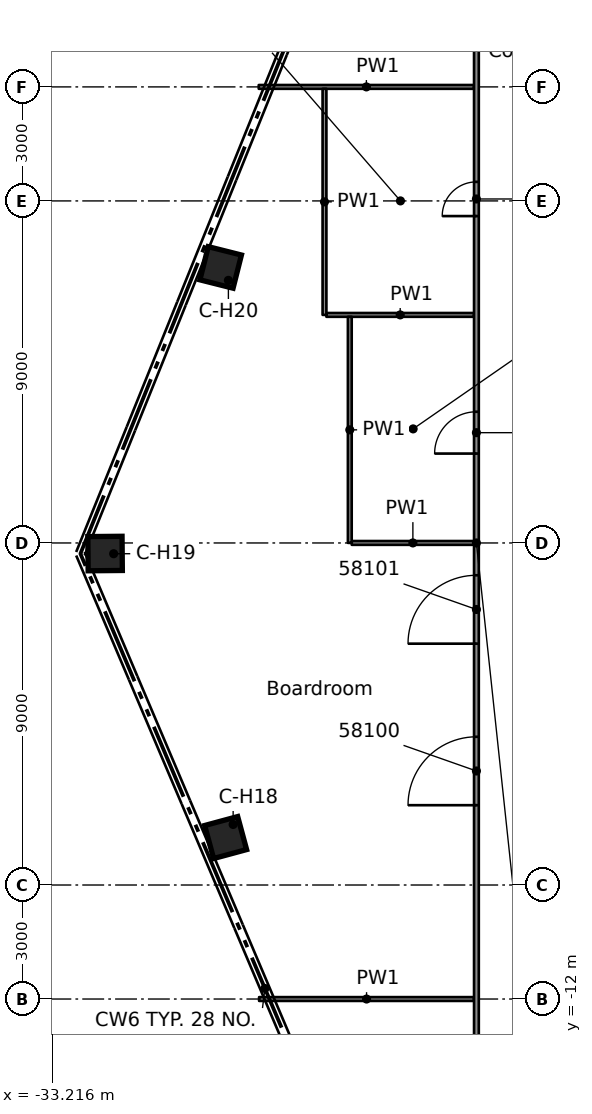
"""IFC4 building model, lengths in metres.
Left out: names, types, materials, properties, quantities, classifications, styles, units other than length and angle.
Written with IfcOpenShell. Run it as: python <this file> out.ifc"""

import sys

from ifc_helpers import new_model, si_unit, direction, frame, frame_2d, origin, origin_2d, place, context, subcontext, project, spatial, rectangle, extrude, element, fill, save


model = new_model("IFC4")
c1 = context("Model", 3, precision=1e-05, world=origin(), true_north=direction((0.0, 1.0)))
c2 = subcontext(c1, "Body", "Model", "MODEL_VIEW")
j1 = project(units=[si_unit("LENGTHUNIT", "METRE"), si_unit("PLANEANGLEUNIT", "RADIAN")], contexts=[c1])
p1 = place(None, origin())
s1 = spatial("IfcSite", under=j1, at=p1, CompositionType="ELEMENT")
p2 = place(p1, origin())
s2 = spatial("IfcBuilding", under=s1, at=p2, CompositionType="ELEMENT")
p3 = place(p2, frame((0.0, 0.0, 285.9)))
s3 = spatial("IfcBuildingStorey", under=s2, at=p3, CompositionType="ELEMENT", Elevation=285.9)
for number, where, z_axis, x_axis in (
    (1, (-28.649, -7.751, 0.0), (0.0, 0.0, 1.0), (-0.965, -0.261, 0.0)),
    (2, (-31.821, -0.278, 0.0), (0.0, 0.0, 1.0), (-1.0, -0.009, 0.0)),
    (3, (-28.78, 7.25, 0.0), (0.0, 0.0, 1.0), (-0.97, 0.244, 0.0)),
):
    element("IfcColumn", number, at=place(p3, frame(where, z_axis=z_axis, x_axis=x_axis)), inside=s3, PredefinedType="COLUMN", context=c2, shape_type="SweptSolid", body=[
        extrude(rectangle(XDim=0.9, YDim=0.9, at=origin_2d()), origin(), (0.0, 0.0, 1.0), 3.5),
    ])
p4 = place(p3, frame((-27.769, -12.0, 0.0), z_axis=(0.0, 0.0, 1.0), x_axis=(1.0, 0.0, 0.0)))
e4 = element("IfcWall", 4, at=p4, inside=s3, PredefinedType="PARTITIONING", context=c2, shape_type="SweptSolid", body=[
    extrude(rectangle(XDim=5.656, YDim=0.1, at=frame_2d((2.828, 0.0))), origin(), (0.0, 0.0, 1.0), 3.08),
])
p5 = place(p3, frame((-25.331, 0.001, 0.0), z_axis=(0.0, 0.0, 1.0), x_axis=(1.0, 0.0, 0.0)))
e5 = element("IfcWall", 5, at=p5, inside=s3, PredefinedType="PARTITIONING", context=c2, shape_type="SweptSolid", body=[
    extrude(rectangle(XDim=3.218, YDim=0.1, at=frame_2d((1.609, 0.0))), origin(), (0.0, 0.0, 1.0), 3.08),
])
p6 = place(p3, frame((-25.998, 6.001, 0.0), z_axis=(0.0, 0.0, 1.0), x_axis=(1.0, 0.0, 0.0)))
e6 = element("IfcWall", 6, at=p6, inside=s3, PredefinedType="PARTITIONING", context=c2, shape_type="SweptSolid", body=[
    extrude(rectangle(XDim=3.885, YDim=0.1, at=frame_2d((1.942, 0.0))), origin(), (0.0, 0.0, 1.0), 3.08),
])
p7 = place(p3, frame((-27.778, 12.0, 0.0), z_axis=(0.0, 0.0, 1.0), x_axis=(1.0, 0.0, 0.0)))
e7 = element("IfcWall", 7, at=p7, inside=s3, PredefinedType="PARTITIONING", context=c2, shape_type="SweptSolid", body=[
    extrude(rectangle(XDim=5.665, YDim=0.1, at=frame_2d((2.833, 0.0))), origin(), (0.0, 0.0, 1.0), 3.08),
])
p8 = place(p3, frame((-22.05, -15.051, 0.0), z_axis=(0.0, 0.0, 1.0), x_axis=(0.0, 1.0, 0.0)))
e8 = element("IfcWall", 8, at=p8, inside=s3, PredefinedType="PARTITIONING", context=c2, shape_type="SweptSolid", body=[
    extrude(rectangle(XDim=30.102, YDim=0.125, at=frame_2d((15.051, 0.0))), origin(), (0.0, 0.0, 1.0), 3.08),
])
p9 = place(p8, frame((8.151, 0.0, 0.0)))
e9 = element("IfcOpeningElement", 9, at=p9, cuts=e8, PredefinedType="OPENING", context=c2, shape_type="SweptSolid", body=[
    extrude(rectangle(XDim=1.8, YDim=2.1, at=frame_2d((0.9, 1.05))), frame((0.0, 0.073, 0.0), z_axis=(0.0, -1.0, 0.0), x_axis=(1.0, 0.0, 0.0)), (0.0, 0.0, 1.0), 0.145),
])
p10 = place(p8, frame((12.401, 0.0, 0.0)))
e10 = element("IfcOpeningElement", 10, at=p10, cuts=e8, PredefinedType="OPENING", context=c2, shape_type="SweptSolid", body=[
    extrude(rectangle(XDim=1.8, YDim=2.1, at=frame_2d((0.9, 1.05))), frame((0.0, 0.073, 0.0), z_axis=(0.0, -1.0, 0.0), x_axis=(1.0, 0.0, 0.0)), (0.0, 0.0, 1.0), 0.145),
])
p11 = place(p8, frame((23.652, 0.0, 0.0)))
e11 = element("IfcOpeningElement", 11, at=p11, cuts=e8, PredefinedType="OPENING", context=c2, shape_type="SweptSolid", body=[
    extrude(rectangle(XDim=0.9, YDim=2.1, at=frame_2d((0.45, 1.05))), frame((0.0, 0.073, 0.0), z_axis=(0.0, -1.0, 0.0), x_axis=(1.0, 0.0, 0.0)), (0.0, 0.0, 1.0), 0.145),
])
p12 = place(p8, frame((17.403, 0.0, 0.0)))
e12 = element("IfcOpeningElement", 12, at=p12, cuts=e8, PredefinedType="OPENING", context=c2, shape_type="SweptSolid", body=[
    extrude(rectangle(XDim=1.1, YDim=2.1, at=frame_2d((0.55, 1.05))), frame((0.0, 0.073, 0.0), z_axis=(0.0, -1.0, 0.0), x_axis=(1.0, 0.0, 0.0)), (0.0, 0.0, 1.0), 0.145),
])
for number, where, z_axis, x_axis in (
    (13, (-25.382, 0.002, 0.0), (0.0, 0.0, 1.0), (0.0, 1.0, 0.0)),
    (14, (-26.048, 6.001, 0.0), (0.0, 0.0, 1.0), (0.0, 1.0, 0.0)),
):
    element("IfcWall", number, at=place(p3, frame(where, z_axis=z_axis, x_axis=x_axis)), inside=s3, PredefinedType="PARTITIONING", context=c2, shape_type="SweptSolid", body=[
        extrude(rectangle(XDim=5.949, YDim=0.1, at=frame_2d((2.975, 0.0))), origin(), (0.0, 0.0, 1.0), 3.08),
    ])
p13 = place(p9, origin())
e15 = element("IfcDoor", 15, at=p13, inside=s3, OperationType="DOUBLE_DOOR_SINGLE_SWING", PredefinedType="DOOR", context=c2, shape_type="SweptSolid", body=[
    extrude(rectangle(XDim=1.8, YDim=2.1, at=frame_2d((0.9, 1.05))), frame((0.0, 0.025, 0.0), z_axis=(0.0, -1.0, 0.0), x_axis=(1.0, 0.0, 0.0)), (0.0, 0.0, 1.0), 0.05),
])
fill(e9, e15)
p14 = place(p10, origin())
e16 = element("IfcDoor", 16, at=p14, inside=s3, OperationType="DOUBLE_DOOR_SINGLE_SWING", PredefinedType="DOOR", context=c2, shape_type="SweptSolid", body=[
    extrude(rectangle(XDim=1.8, YDim=2.1, at=frame_2d((0.9, 1.05))), frame((0.0, 0.025, 0.0), z_axis=(0.0, -1.0, 0.0), x_axis=(1.0, 0.0, 0.0)), (0.0, 0.0, 1.0), 0.05),
])
fill(e10, e16)
p15 = place(p11, origin())
e17 = element("IfcDoor", 17, at=p15, inside=s3, OperationType="SINGLE_SWING_RIGHT", PredefinedType="DOOR", context=c2, shape_type="SweptSolid", body=[
    extrude(rectangle(XDim=0.9, YDim=2.1, at=frame_2d((0.45, 1.05))), frame((0.0, 0.025, 0.0), z_axis=(0.0, -1.0, 0.0), x_axis=(1.0, 0.0, 0.0)), (0.0, 0.0, 1.0), 0.05),
])
fill(e11, e17)
p16 = place(p12, origin())
e18 = element("IfcDoor", 18, at=p16, inside=s3, OperationType="SINGLE_SWING_RIGHT", PredefinedType="DOOR", context=c2, shape_type="SweptSolid", body=[
    extrude(rectangle(XDim=1.1, YDim=2.1, at=frame_2d((0.55, 1.05))), frame((0.0, 0.025, 0.0), z_axis=(0.0, -1.0, 0.0), x_axis=(1.0, 0.0, 0.0)), (0.0, 0.0, 1.0), 0.05),
])
fill(e12, e18)
save(model, sys.argv[1])
